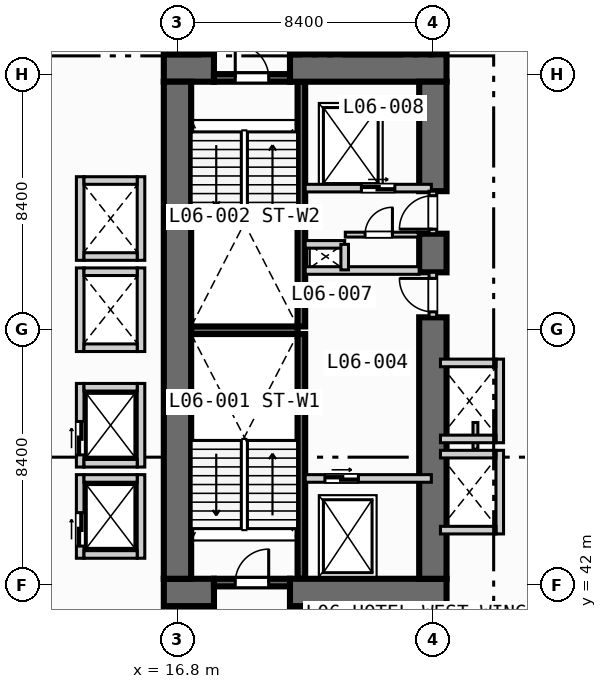
"""IFC4 building model, lengths in metres.
Left out: names, types, materials, properties, quantities, classifications, styles, units other than length and angle.
Written with IfcOpenShell. Run it as: python <this file> out.ifc"""

import sys

from ifc_helpers import new_model, si_unit, direction, frame, frame_2d, origin, place, context, subcontext, project, spatial, rectangle, extrude, element, fill, save


model = new_model("IFC4")
c1 = context("Model", 3, precision=1e-05, world=origin(), true_north=direction((0.0, 1.0)))
c2 = subcontext(c1, "Body", "Model", "MODEL_VIEW")
j1 = project(units=[si_unit("LENGTHUNIT", "METRE"), si_unit("PLANEANGLEUNIT", "RADIAN")], contexts=[c1])
p1 = place(None, origin())
s1 = spatial("IfcSite", under=j1, at=p1, CompositionType="ELEMENT")
p2 = place(p1, origin())
s2 = spatial("IfcBuilding", under=s1, at=p2, CompositionType="ELEMENT")
p3 = place(p2, frame((0.0, 0.0, 32.0)))
s3 = spatial("IfcBuildingStorey", under=s2, at=p3, CompositionType="ELEMENT", Elevation=32.0)
for number, where, z_axis, x_axis in (
    (1, (20.875, 42.2, 0.0), (0.0, 0.0, 1.0), (0.0, 1.0, 0.0)),
    (2, (20.875, 50.5, 0.0), (0.0, 0.0, 1.0), (0.0, 1.0, 0.0)),
):
    element("IfcWall", number, at=place(p3, frame(where, z_axis=z_axis, x_axis=x_axis)), inside=s3, PredefinedType="SOLIDWALL", context=c2, shape_type="SweptSolid", body=[
        extrude(rectangle(XDim=8.05, YDim=0.25, at=frame_2d((4.025, 0.0))), origin(), (0.0, 0.0, 1.0), 3.55),
    ])
p4 = place(p3, frame((17.25, 50.375, 0.0), z_axis=(0.0, 0.0, 1.0), x_axis=(1.0, 0.0, 0.0)))
e3 = element("IfcWall", 3, at=p4, inside=s3, PredefinedType="SOLIDWALL", context=c2, shape_type="SweptSolid", body=[
    extrude(rectangle(XDim=3.5, YDim=0.25, at=frame_2d((1.75, 0.0))), origin(), (0.0, 0.0, 1.0), 3.55),
])
p5 = place(p3, frame((16.35, 41.75, 0.0), z_axis=(0.0, 0.0, 1.0), x_axis=(1.0, 0.0, 0.0)))
e4 = element("IfcWall", 4, at=p5, inside=s3, PredefinedType="SHEAR", context=c2, shape_type="SweptSolid", body=[
    extrude(rectangle(XDim=1.65, YDim=0.9, at=frame_2d((0.825, 0.0))), origin(), (0.0, 0.0, 1.0), 3.55),
])
p6 = place(p3, frame((20.5, 41.75, 0.0), z_axis=(0.0, 0.0, 1.0), x_axis=(1.0, 0.0, 0.0)))
e5 = element("IfcWall", 5, at=p6, inside=s3, PredefinedType="SHEAR", context=c2, shape_type="SweptSolid", body=[
    extrude(rectangle(XDim=5.15, YDim=0.9, at=frame_2d((2.575, 0.0))), origin(), (0.0, 0.0, 1.0), 3.55),
])
p7 = place(p3, frame((16.35, 59.0, 0.0), z_axis=(0.0, 0.0, 1.0), x_axis=(1.0, 0.0, 0.0)))
e6 = element("IfcWall", 6, at=p7, inside=s3, PredefinedType="SHEAR", context=c2, shape_type="SweptSolid", body=[
    extrude(rectangle(XDim=1.65, YDim=0.9, at=frame_2d((0.825, 0.0))), origin(), (0.0, 0.0, 1.0), 3.55),
])
p8 = place(p3, frame((20.5, 59.0, 0.0), z_axis=(0.0, 0.0, 1.0), x_axis=(1.0, 0.0, 0.0)))
e7 = element("IfcWall", 7, at=p8, inside=s3, PredefinedType="SHEAR", context=c2, shape_type="SweptSolid", body=[
    extrude(rectangle(XDim=5.15, YDim=0.9, at=frame_2d((2.575, 0.0))), origin(), (0.0, 0.0, 1.0), 3.55),
])
p9 = place(p3, frame((16.8, 42.2, 0.0), z_axis=(0.0, 0.0, 1.0), x_axis=(0.0, 1.0, 0.0)))
e8 = element("IfcWall", 8, at=p9, inside=s3, PredefinedType="SHEAR", context=c2, shape_type="SweptSolid", body=[
    extrude(rectangle(XDim=16.35, YDim=0.9, at=frame_2d((8.175, 0.0))), origin(), (0.0, 0.0, 1.0), 3.55),
])
p10 = place(p3, frame((25.2, 42.2, 0.0), z_axis=(0.0, 0.0, 1.0), x_axis=(0.0, 1.0, 0.0)))
e9 = element("IfcWall", 9, at=p10, inside=s3, PredefinedType="SHEAR", context=c2, shape_type="SweptSolid", body=[
    extrude(rectangle(XDim=8.6, YDim=0.9, at=frame_2d((4.3, 0.0))), origin(), (0.0, 0.0, 1.0), 3.55),
])
p11 = place(p3, frame((25.2, 52.28, 0.0), z_axis=(0.0, 0.0, 1.0), x_axis=(0.0, 1.0, 0.0)))
e10 = element("IfcWall", 10, at=p11, inside=s3, PredefinedType="SHEAR", context=c2, shape_type="SweptSolid", body=[
    extrude(rectangle(XDim=1.27, YDim=0.9, at=frame_2d((0.635, 0.0))), origin(), (0.0, 0.0, 1.0), 3.55),
])
p12 = place(p3, frame((25.2, 54.95, 0.0), z_axis=(0.0, 0.0, 1.0), x_axis=(0.0, 1.0, 0.0)))
e11 = element("IfcWall", 11, at=p12, inside=s3, PredefinedType="SHEAR", context=c2, shape_type="SweptSolid", body=[
    extrude(rectangle(XDim=3.6, YDim=0.9, at=frame_2d((1.8, 0.0))), origin(), (0.0, 0.0, 1.0), 3.55),
])
p13 = place(p3, frame((18.0, 42.075, 0.0), z_axis=(0.0, 0.0, 1.0), x_axis=(1.0, 0.0, 0.0)))
e12 = element("IfcWall", 12, at=p13, inside=s3, PredefinedType="SOLIDWALL", context=c2, shape_type="SweptSolid", body=[
    extrude(rectangle(XDim=2.5, YDim=0.25, at=frame_2d((1.25, 0.0))), origin(), (0.0, 0.0, 1.0), 3.55),
])
p14 = place(p13, frame((0.7, 0.0, 0.0)))
e13 = element("IfcOpeningElement", 13, at=p14, cuts=e12, PredefinedType="OPENING", context=c2, shape_type="SweptSolid", body=[
    extrude(rectangle(XDim=1.1, YDim=2.15, at=frame_2d((0.55, 1.075))), frame((0.0, 0.135, 0.0), z_axis=(0.0, -1.0, 0.0), x_axis=(1.0, 0.0, 0.0)), (0.0, 0.0, 1.0), 0.27),
])
p15 = place(p3, frame((18.0, 58.675, 0.0), z_axis=(0.0, 0.0, 1.0), x_axis=(1.0, 0.0, 0.0)))
e14 = element("IfcWall", 14, at=p15, inside=s3, PredefinedType="SOLIDWALL", context=c2, shape_type="SweptSolid", body=[
    extrude(rectangle(XDim=2.5, YDim=0.25, at=frame_2d((1.25, 0.0))), origin(), (0.0, 0.0, 1.0), 3.55),
])
p16 = place(p15, frame((0.7, 0.0, 0.0)))
e15 = element("IfcOpeningElement", 15, at=p16, cuts=e14, PredefinedType="OPENING", context=c2, shape_type="SweptSolid", body=[
    extrude(rectangle(XDim=1.1, YDim=2.15, at=frame_2d((0.55, 1.075))), frame((0.0, 0.135, 0.0), z_axis=(0.0, -1.0, 0.0), x_axis=(1.0, 0.0, 0.0)), (0.0, 0.0, 1.0), 0.27),
])
p17 = place(p3, frame((21.0, 45.5, 0.0), z_axis=(0.0, 0.0, 1.0), x_axis=(1.0, 0.0, 0.0)))
e16 = element("IfcWall", 16, at=p17, inside=s3, PredefinedType="SOLIDWALL", context=c2, shape_type="SweptSolid", body=[
    extrude(rectangle(XDim=4.15, YDim=0.25, at=frame_2d((2.075, 0.0))), origin(), (0.0, 0.0, 1.0), 3.55),
])
p18 = place(p17, frame((0.65, 0.0, 0.0)))
e17 = element("IfcOpeningElement", 17, at=p18, cuts=e16, PredefinedType="OPENING", context=c2, shape_type="SweptSolid", body=[
    extrude(rectangle(XDim=1.1, YDim=2.15, at=frame_2d((0.55, 1.075))), frame((0.0, 0.135, 0.0), z_axis=(0.0, -1.0, 0.0), x_axis=(1.0, 0.0, 0.0)), (0.0, 0.0, 1.0), 0.27),
])
p19 = place(p3, frame((25.2, 50.8, 0.0), z_axis=(0.0, 0.0, 1.0), x_axis=(0.0, 1.0, 0.0)))
e18 = element("IfcWall", 18, at=p19, inside=s3, PredefinedType="SOLIDWALL", context=c2, shape_type="SweptSolid", body=[
    extrude(rectangle(XDim=1.48, YDim=0.25, at=frame_2d((0.74, 0.0))), origin(), (0.0, 0.0, 1.0), 3.55),
])
p20 = place(p19, frame((0.18, 0.0, 0.0)))
e19 = element("IfcOpeningElement", 19, at=p20, cuts=e18, PredefinedType="OPENING", context=c2, shape_type="SweptSolid", body=[
    extrude(rectangle(XDim=1.1, YDim=2.15, at=frame_2d((0.55, 1.075))), frame((0.0, 0.135, 0.0), z_axis=(0.0, -1.0, 0.0), x_axis=(1.0, 0.0, 0.0)), (0.0, 0.0, 1.0), 0.27),
])
p21 = place(p3, frame((21.0, 52.34, 0.0), z_axis=(0.0, 0.0, 1.0), x_axis=(1.0, 0.0, 0.0)))
e20 = element("IfcWall", 20, at=p21, inside=s3, PredefinedType="SOLIDWALL", context=c2, shape_type="SweptSolid", body=[
    extrude(rectangle(XDim=3.75, YDim=0.25, at=frame_2d((1.875, 0.0))), origin(), (0.0, 0.0, 1.0), 3.55),
])
p22 = place(p3, frame((21.0, 55.05, 0.0), z_axis=(0.0, 0.0, 1.0), x_axis=(1.0, 0.0, 0.0)))
e21 = element("IfcWall", 21, at=p22, inside=s3, PredefinedType="SOLIDWALL", context=c2, shape_type="SweptSolid", body=[
    extrude(rectangle(XDim=4.15, YDim=0.25, at=frame_2d((2.075, 0.0))), origin(), (0.0, 0.0, 1.0), 3.55),
])
p23 = place(p22, frame((1.85, 0.0, 0.0)))
e22 = element("IfcOpeningElement", 22, at=p23, cuts=e21, PredefinedType="OPENING", context=c2, shape_type="SweptSolid", body=[
    extrude(rectangle(XDim=1.1, YDim=2.15, at=frame_2d((0.55, 1.075))), frame((0.0, 0.135, 0.0), z_axis=(0.0, -1.0, 0.0), x_axis=(1.0, 0.0, 0.0)), (0.0, 0.0, 1.0), 0.27),
])
p24 = place(p3, frame((25.2, 53.55, 0.0), z_axis=(0.0, 0.0, 1.0), x_axis=(0.0, 1.0, 0.0)))
e23 = element("IfcWall", 23, at=p24, inside=s3, PredefinedType="SOLIDWALL", context=c2, shape_type="SweptSolid", body=[
    extrude(rectangle(XDim=1.4, YDim=0.25, at=frame_2d((0.7, 0.0))), origin(), (0.0, 0.0, 1.0), 3.55),
])
p25 = place(p24, frame((0.15, 0.0, 0.0)))
e24 = element("IfcOpeningElement", 24, at=p25, cuts=e23, PredefinedType="OPENING", context=c2, shape_type="SweptSolid", body=[
    extrude(rectangle(XDim=1.1, YDim=2.15, at=frame_2d((0.55, 1.075))), frame((0.0, 0.135, 0.0), z_axis=(0.0, -1.0, 0.0), x_axis=(1.0, 0.0, 0.0)), (0.0, 0.0, 1.0), 0.27),
])
p26 = place(p3, frame((21.0, 53.2, 0.0), z_axis=(0.0, 0.0, 1.0), x_axis=(1.0, 0.0, 0.0)))
e25 = element("IfcWall", 25, at=p26, inside=s3, PredefinedType="SOLIDWALL", context=c2, shape_type="SweptSolid", body=[
    extrude(rectangle(XDim=1.3, YDim=0.25, at=frame_2d((0.65, 0.0))), origin(), (0.0, 0.0, 1.0), 3.55),
])
p27 = place(p3, frame((22.3, 52.36, 0.0), z_axis=(0.0, 0.0, 1.0), x_axis=(0.0, 1.0, 0.0)))
e26 = element("IfcWall", 26, at=p27, inside=s3, PredefinedType="SOLIDWALL", context=c2, shape_type="SweptSolid", body=[
    extrude(rectangle(XDim=0.84, YDim=0.25, at=frame_2d((0.42, 0.0))), origin(), (0.0, 0.0, 1.0), 3.55),
])
p28 = place(p3, frame((22.32, 53.52, 0.0), z_axis=(0.0, 0.0, 1.0), x_axis=(1.0, 0.0, 0.0)))
e27 = element("IfcWall", 27, at=p28, inside=s3, PredefinedType="PARTITIONING", context=c2, shape_type="SweptSolid", body=[
    extrude(rectangle(XDim=2.4, YDim=0.16, at=frame_2d((1.2, 0.0))), origin(), (0.0, 0.0, 1.0), 3.55),
])
p29 = place(p28, frame((0.65, 0.0, 0.0)))
e28 = element("IfcOpeningElement", 28, at=p29, cuts=e27, PredefinedType="OPENING", context=c2, shape_type="SweptSolid", body=[
    extrude(rectangle(XDim=0.9, YDim=2.1, at=frame_2d((0.45, 1.05))), frame((0.0, 0.09, 0.0), z_axis=(0.0, -1.0, 0.0), x_axis=(1.0, 0.0, 0.0)), (0.0, 0.0, 1.0), 0.18),
])
p30 = place(p3, frame((13.6, 42.875, 0.0), z_axis=(0.0, 0.0, 1.0), x_axis=(0.0, 1.0, 0.0)))
e29 = element("IfcWall", 29, at=p30, inside=s3, PredefinedType="SOLIDWALL", context=c2, shape_type="SweptSolid", body=[
    extrude(rectangle(XDim=2.75, YDim=0.25, at=frame_2d((1.375, 0.0))), origin(), (0.0, 0.0, 1.0), 3.55),
])
p31 = place(p30, frame((0.4, 0.0, 0.0)))
e30 = element("IfcOpeningElement", 30, at=p31, cuts=e29, PredefinedType="OPENING", context=c2, shape_type="SweptSolid", body=[
    extrude(rectangle(XDim=1.1, YDim=2.15, at=frame_2d((0.55, 1.075))), frame((0.0, 0.135, 0.0), z_axis=(0.0, -1.0, 0.0), x_axis=(1.0, 0.0, 0.0)), (0.0, 0.0, 1.0), 0.27),
])
p32 = place(p3, frame((15.6, 42.875, 0.0), z_axis=(0.0, 0.0, 1.0), x_axis=(0.0, 1.0, 0.0)))
e31 = element("IfcWall", 31, at=p32, inside=s3, PredefinedType="SOLIDWALL", context=c2, shape_type="SweptSolid", body=[
    extrude(rectangle(XDim=2.75, YDim=0.25, at=frame_2d((1.375, 0.0))), origin(), (0.0, 0.0, 1.0), 3.55),
])
for number, where, z_axis, x_axis in (
    (32, (13.725, 43.0, 0.0), (0.0, 0.0, 1.0), (1.0, 0.0, 0.0)),
    (33, (13.725, 45.5, 0.0), (0.0, 0.0, 1.0), (1.0, 0.0, 0.0)),
):
    element("IfcWall", number, at=place(p3, frame(where, z_axis=z_axis, x_axis=x_axis)), inside=s3, PredefinedType="SOLIDWALL", context=c2, shape_type="SweptSolid", body=[
        extrude(rectangle(XDim=1.75, YDim=0.25, at=frame_2d((0.875, 0.0))), origin(), (0.0, 0.0, 1.0), 3.55),
    ])
p33 = place(p3, frame((13.6, 45.875, 0.0), z_axis=(0.0, 0.0, 1.0), x_axis=(0.0, 1.0, 0.0)))
e34 = element("IfcWall", 34, at=p33, inside=s3, PredefinedType="SOLIDWALL", context=c2, shape_type="SweptSolid", body=[
    extrude(rectangle(XDim=2.75, YDim=0.25, at=frame_2d((1.375, 0.0))), origin(), (0.0, 0.0, 1.0), 3.55),
])
p34 = place(p33, frame((0.4, 0.0, 0.0)))
e35 = element("IfcOpeningElement", 35, at=p34, cuts=e34, PredefinedType="OPENING", context=c2, shape_type="SweptSolid", body=[
    extrude(rectangle(XDim=1.1, YDim=2.15, at=frame_2d((0.55, 1.075))), frame((0.0, 0.135, 0.0), z_axis=(0.0, -1.0, 0.0), x_axis=(1.0, 0.0, 0.0)), (0.0, 0.0, 1.0), 0.27),
])
p35 = place(p3, frame((15.6, 45.875, 0.0), z_axis=(0.0, 0.0, 1.0), x_axis=(0.0, 1.0, 0.0)))
e36 = element("IfcWall", 36, at=p35, inside=s3, PredefinedType="SOLIDWALL", context=c2, shape_type="SweptSolid", body=[
    extrude(rectangle(XDim=2.75, YDim=0.25, at=frame_2d((1.375, 0.0))), origin(), (0.0, 0.0, 1.0), 3.55),
])
for number, where, z_axis, x_axis in (
    (37, (13.725, 46.0, 0.0), (0.0, 0.0, 1.0), (1.0, 0.0, 0.0)),
    (38, (13.725, 48.5, 0.0), (0.0, 0.0, 1.0), (1.0, 0.0, 0.0)),
):
    element("IfcWall", number, at=place(p3, frame(where, z_axis=z_axis, x_axis=x_axis)), inside=s3, PredefinedType="SOLIDWALL", context=c2, shape_type="SweptSolid", body=[
        extrude(rectangle(XDim=1.75, YDim=0.25, at=frame_2d((0.875, 0.0))), origin(), (0.0, 0.0, 1.0), 3.55),
    ])
for number, where, z_axis, x_axis in (
    (39, (13.6, 49.675, 0.0), (0.0, 0.0, 1.0), (0.0, 1.0, 0.0)),
    (40, (15.6, 49.675, 0.0), (0.0, 0.0, 1.0), (0.0, 1.0, 0.0)),
):
    element("IfcWall", number, at=place(p3, frame(where, z_axis=z_axis, x_axis=x_axis)), inside=s3, PredefinedType="SOLIDWALL", context=c2, shape_type="SweptSolid", body=[
        extrude(rectangle(XDim=2.75, YDim=0.25, at=frame_2d((1.375, 0.0))), origin(), (0.0, 0.0, 1.0), 3.55),
    ])
for number, where, z_axis, x_axis in (
    (41, (13.725, 49.8, 0.0), (0.0, 0.0, 1.0), (1.0, 0.0, 0.0)),
    (42, (13.725, 52.3, 0.0), (0.0, 0.0, 1.0), (1.0, 0.0, 0.0)),
):
    element("IfcWall", number, at=place(p3, frame(where, z_axis=z_axis, x_axis=x_axis)), inside=s3, PredefinedType="SOLIDWALL", context=c2, shape_type="SweptSolid", body=[
        extrude(rectangle(XDim=1.75, YDim=0.25, at=frame_2d((0.875, 0.0))), origin(), (0.0, 0.0, 1.0), 3.55),
    ])
for number, where, z_axis, x_axis in (
    (43, (13.6, 52.675, 0.0), (0.0, 0.0, 1.0), (0.0, 1.0, 0.0)),
    (44, (15.6, 52.675, 0.0), (0.0, 0.0, 1.0), (0.0, 1.0, 0.0)),
):
    element("IfcWall", number, at=place(p3, frame(where, z_axis=z_axis, x_axis=x_axis)), inside=s3, PredefinedType="SOLIDWALL", context=c2, shape_type="SweptSolid", body=[
        extrude(rectangle(XDim=2.75, YDim=0.25, at=frame_2d((1.375, 0.0))), origin(), (0.0, 0.0, 1.0), 3.55),
    ])
for number, where, z_axis, x_axis in (
    (45, (13.725, 52.8, 0.0), (0.0, 0.0, 1.0), (1.0, 0.0, 0.0)),
    (46, (13.725, 55.3, 0.0), (0.0, 0.0, 1.0), (1.0, 0.0, 0.0)),
):
    element("IfcWall", number, at=place(p3, frame(where, z_axis=z_axis, x_axis=x_axis)), inside=s3, PredefinedType="SOLIDWALL", context=c2, shape_type="SweptSolid", body=[
        extrude(rectangle(XDim=1.75, YDim=0.25, at=frame_2d((0.875, 0.0))), origin(), (0.0, 0.0, 1.0), 3.55),
    ])
p36 = place(p3, frame((27.4, 43.675, 0.0), z_axis=(0.0, 0.0, 1.0), x_axis=(0.0, 1.0, 0.0)))
e47 = element("IfcWall", 47, at=p36, inside=s3, PredefinedType="SOLIDWALL", context=c2, shape_type="SweptSolid", body=[
    extrude(rectangle(XDim=2.75, YDim=0.25, at=frame_2d((1.375, 0.0))), origin(), (0.0, 0.0, 1.0), 3.55),
])
for number, where, z_axis, x_axis in (
    (48, (25.45, 43.8, 0.0), (0.0, 0.0, 1.0), (1.0, 0.0, 0.0)),
    (49, (25.45, 46.3, 0.0), (0.0, 0.0, 1.0), (1.0, 0.0, 0.0)),
):
    element("IfcWall", number, at=place(p3, frame(where, z_axis=z_axis, x_axis=x_axis)), inside=s3, PredefinedType="SOLIDWALL", context=c2, shape_type="SweptSolid", body=[
        extrude(rectangle(XDim=1.825, YDim=0.25, at=frame_2d((0.913, 0.0))), origin(), (0.0, 0.0, 1.0), 3.55),
    ])
p37 = place(p3, frame((26.6, 46.46, 0.0), z_axis=(0.0, 0.0, 1.0), x_axis=(0.0, 1.0, 0.0)))
e50 = element("IfcWall", 50, at=p37, inside=s3, PredefinedType="PARTITIONING", context=c2, shape_type="SweptSolid", body=[
    extrude(rectangle(XDim=0.88, YDim=0.16, at=frame_2d((0.44, 0.0))), origin(), (0.0, 0.0, 1.0), 3.55),
])
p38 = place(p3, frame((27.4, 46.675, 0.0), z_axis=(0.0, 0.0, 1.0), x_axis=(0.0, 1.0, 0.0)))
e51 = element("IfcWall", 51, at=p38, inside=s3, PredefinedType="SOLIDWALL", context=c2, shape_type="SweptSolid", body=[
    extrude(rectangle(XDim=2.75, YDim=0.25, at=frame_2d((1.375, 0.0))), origin(), (0.0, 0.0, 1.0), 3.55),
])
for number, where, z_axis, x_axis in (
    (52, (25.45, 46.8, 0.0), (0.0, 0.0, 1.0), (1.0, 0.0, 0.0)),
    (53, (25.45, 49.3, 0.0), (0.0, 0.0, 1.0), (1.0, 0.0, 0.0)),
):
    element("IfcWall", number, at=place(p3, frame(where, z_axis=z_axis, x_axis=x_axis)), inside=s3, PredefinedType="SOLIDWALL", context=c2, shape_type="SweptSolid", body=[
        extrude(rectangle(XDim=1.825, YDim=0.25, at=frame_2d((0.913, 0.0))), origin(), (0.0, 0.0, 1.0), 3.55),
    ])
p39 = place(p14, origin())
e54 = element("IfcDoor", 54, at=p39, inside=s3, OperationType="SINGLE_SWING_RIGHT", PredefinedType="DOOR", context=c2, shape_type="SweptSolid", body=[
    extrude(rectangle(XDim=1.1, YDim=2.15, at=frame_2d((0.55, 1.075))), frame((0.0, 0.025, 0.0), z_axis=(0.0, -1.0, 0.0), x_axis=(1.0, 0.0, 0.0)), (0.0, 0.0, 1.0), 0.05),
])
fill(e13, e54)
p40 = place(p16, origin())
e55 = element("IfcDoor", 55, at=p40, inside=s3, OperationType="SINGLE_SWING_LEFT", PredefinedType="DOOR", context=c2, shape_type="SweptSolid", body=[
    extrude(rectangle(XDim=1.1, YDim=2.15, at=frame_2d((0.55, 1.075))), frame((0.0, 0.025, 0.0), z_axis=(0.0, -1.0, 0.0), x_axis=(1.0, 0.0, 0.0)), (0.0, 0.0, 1.0), 0.05),
])
fill(e15, e55)
p41 = place(p18, origin())
e56 = element("IfcDoor", 56, at=p41, inside=s3, OperationType="SLIDING_TO_LEFT", PredefinedType="DOOR", context=c2, shape_type="SweptSolid", body=[
    extrude(rectangle(XDim=1.1, YDim=2.15, at=frame_2d((0.55, 1.075))), frame((0.0, 0.025, 0.0), z_axis=(0.0, -1.0, 0.0), x_axis=(1.0, 0.0, 0.0)), (0.0, 0.0, 1.0), 0.05),
])
fill(e17, e56)
p42 = place(p20, origin())
e57 = element("IfcDoor", 57, at=p42, inside=s3, OperationType="SINGLE_SWING_RIGHT", PredefinedType="DOOR", context=c2, shape_type="SweptSolid", body=[
    extrude(rectangle(XDim=1.1, YDim=2.15, at=frame_2d((0.55, 1.075))), frame((0.0, 0.025, 0.0), z_axis=(0.0, -1.0, 0.0), x_axis=(1.0, 0.0, 0.0)), (0.0, 0.0, 1.0), 0.05),
])
fill(e19, e57)
p43 = place(p23, origin())
e58 = element("IfcDoor", 58, at=p43, inside=s3, OperationType="SLIDING_TO_LEFT", PredefinedType="DOOR", context=c2, shape_type="SweptSolid", body=[
    extrude(rectangle(XDim=1.1, YDim=2.15, at=frame_2d((0.55, 1.075))), frame((0.0, 0.025, 0.0), z_axis=(0.0, -1.0, 0.0), x_axis=(1.0, 0.0, 0.0)), (0.0, 0.0, 1.0), 0.05),
])
fill(e22, e58)
p44 = place(p25, origin())
e59 = element("IfcDoor", 59, at=p44, inside=s3, OperationType="SINGLE_SWING_LEFT", PredefinedType="DOOR", context=c2, shape_type="SweptSolid", body=[
    extrude(rectangle(XDim=1.1, YDim=2.15, at=frame_2d((0.55, 1.075))), frame((0.0, 0.025, 0.0), z_axis=(0.0, -1.0, 0.0), x_axis=(1.0, 0.0, 0.0)), (0.0, 0.0, 1.0), 0.05),
])
fill(e24, e59)
p45 = place(p29, origin())
e60 = element("IfcDoor", 60, at=p45, inside=s3, OperationType="SINGLE_SWING_RIGHT", PredefinedType="DOOR", context=c2, shape_type="SweptSolid", body=[
    extrude(rectangle(XDim=0.9, YDim=2.1, at=frame_2d((0.45, 1.05))), frame((0.0, 0.025, 0.0), z_axis=(0.0, -1.0, 0.0), x_axis=(1.0, 0.0, 0.0)), (0.0, 0.0, 1.0), 0.05),
])
fill(e28, e60)
p46 = place(p31, origin())
e61 = element("IfcDoor", 61, at=p46, inside=s3, OperationType="SLIDING_TO_LEFT", PredefinedType="DOOR", context=c2, shape_type="SweptSolid", body=[
    extrude(rectangle(XDim=1.1, YDim=2.15, at=frame_2d((0.55, 1.075))), frame((0.0, 0.025, 0.0), z_axis=(0.0, -1.0, 0.0), x_axis=(1.0, 0.0, 0.0)), (0.0, 0.0, 1.0), 0.05),
])
fill(e30, e61)
p47 = place(p34, origin())
e62 = element("IfcDoor", 62, at=p47, inside=s3, OperationType="SLIDING_TO_LEFT", PredefinedType="DOOR", context=c2, shape_type="SweptSolid", body=[
    extrude(rectangle(XDim=1.1, YDim=2.15, at=frame_2d((0.55, 1.075))), frame((0.0, 0.025, 0.0), z_axis=(0.0, -1.0, 0.0), x_axis=(1.0, 0.0, 0.0)), (0.0, 0.0, 1.0), 0.05),
])
fill(e35, e62)
save(model, sys.argv[1])
